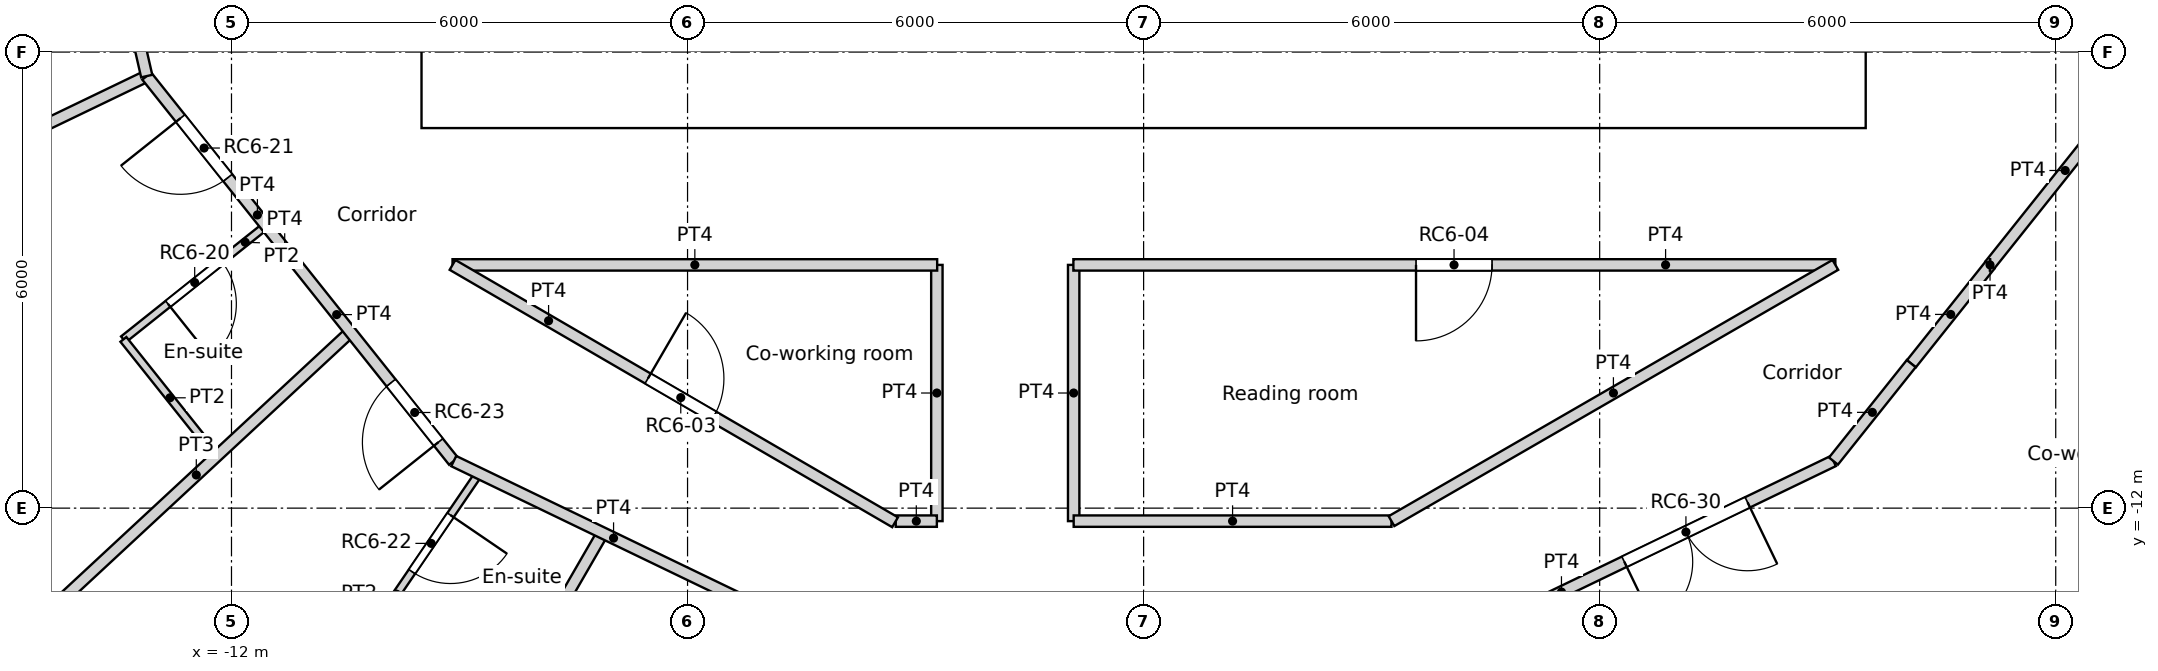
"""IFC4 building model, lengths in metres.
Left out: names, types, materials, properties, quantities, classifications, styles, units other than length and angle.
Written with IfcOpenShell. Run it as: python <this file> out.ifc"""

import sys

from ifc_helpers import new_model, si_unit, direction, frame, frame_2d, origin, origin_2d, place, context, subcontext, project, spatial, rectangle, circle, extrude, element, fill, save


model = new_model("IFC4")
c1 = context("Model", 3, precision=1e-05, world=origin(), true_north=direction((0.0, 1.0)))
c2 = subcontext(c1, "Body", "Model", "MODEL_VIEW")
j1 = project(units=[si_unit("LENGTHUNIT", "METRE"), si_unit("PLANEANGLEUNIT", "RADIAN")], contexts=[c1])
p1 = place(None, origin())
s1 = spatial("IfcSite", under=j1, at=p1, CompositionType="ELEMENT")
p2 = place(p1, origin())
s2 = spatial("IfcBuilding", under=s1, at=p2, CompositionType="ELEMENT")
p3 = place(p2, frame((0.0, 0.0, 283.8)))
s3 = spatial("IfcBuildingStorey", under=s2, at=p3, CompositionType="ELEMENT", Elevation=283.8)
p4 = place(p3, frame((-13.798, -12.802, 0.0), z_axis=(0.0, 0.0, 1.0), x_axis=(1.0, 0.0, 0.0)))
e1 = element("IfcColumn", 1, at=p4, inside=s3, PredefinedType="COLUMN", context=c2, shape_type="SweptSolid", body=[
    extrude(circle(Radius=0.45, at=origin_2d()), origin(), (0.0, 0.0, 1.0), 3.6),
])
p5 = place(p3, frame((-9.5, -6.7, 0.0), z_axis=(0.0, 0.0, 1.0), x_axis=(1.0, 0.0, 0.0)))
e2 = element("IfcWall", 2, at=p5, inside=s3, PredefinedType="SOLIDWALL", context=c2, shape_type="SweptSolid", body=[
    extrude(rectangle(XDim=19.0, YDim=0.6, at=frame_2d((9.5, 0.0))), origin(), (0.0, 0.0, 1.0), 3.6),
])
p6 = place(p5, frame((10.4, 0.0, 0.0)))
e3 = element("IfcOpeningElement", 3, at=p6, cuts=e2, PredefinedType="OPENING", context=c2, shape_type="SweptSolid", body=[
    extrude(rectangle(XDim=1.0, YDim=2.1, at=frame_2d((0.5, 1.05))), frame((0.0, 0.3, 0.0), z_axis=(0.0, -1.0, 0.0), x_axis=(1.0, 0.0, 0.0)), (0.0, 0.0, 1.0), 0.6),
])
p7 = place(p5, frame((5.35, 0.0, 0.0)))
e4 = element("IfcOpeningElement", 4, at=p7, cuts=e2, PredefinedType="OPENING", context=c2, shape_type="SweptSolid", body=[
    extrude(rectangle(XDim=1.7, YDim=2.1, at=frame_2d((0.85, 1.05))), frame((0.0, 0.3, 0.0), z_axis=(0.0, -1.0, 0.0), x_axis=(1.0, 0.0, 0.0)), (0.0, 0.0, 1.0), 0.6),
])
p8 = place(p5, frame((11.95, 0.0, 0.0)))
e5 = element("IfcOpeningElement", 5, at=p8, cuts=e2, PredefinedType="OPENING", context=c2, shape_type="SweptSolid", body=[
    extrude(rectangle(XDim=1.7, YDim=2.1, at=frame_2d((0.85, 1.05))), frame((0.0, 0.3, 0.0), z_axis=(0.0, -1.0, 0.0), x_axis=(1.0, 0.0, 0.0)), (0.0, 0.0, 1.0), 0.6),
])
p9 = place(p3, frame((-9.2, -6.4, 0.0), z_axis=(0.0, 0.0, 1.0), x_axis=(0.0, 1.0, 0.0)))
e6 = element("IfcWall", 6, at=p9, inside=s3, PredefinedType="SOLIDWALL", context=c2, shape_type="SweptSolid", body=[
    extrude(rectangle(XDim=12.8, YDim=0.6, at=frame_2d((6.4, 0.0))), origin(), (0.0, 0.0, 1.0), 3.6),
])
p10 = place(p3, frame((9.2, -6.4, 0.0), z_axis=(0.0, 0.0, 1.0), x_axis=(0.0, 1.0, 0.0)))
e7 = element("IfcWall", 7, at=p10, inside=s3, PredefinedType="SOLIDWALL", context=c2, shape_type="SweptSolid", body=[
    extrude(rectangle(XDim=12.8, YDim=0.6, at=frame_2d((6.4, 0.0))), origin(), (0.0, 0.0, 1.0), 3.6),
])
p11 = place(p10, frame((6.4, 0.0, 0.0)))
e8 = element("IfcOpeningElement", 8, at=p11, cuts=e7, PredefinedType="OPENING", context=c2, shape_type="SweptSolid", body=[
    extrude(rectangle(XDim=1.8, YDim=2.1, at=frame_2d((0.9, 1.05))), frame((0.0, 0.3, 0.0), z_axis=(0.0, -1.0, 0.0), x_axis=(1.0, 0.0, 0.0)), (0.0, 0.0, 1.0), 0.6),
])
for number, where, z_axis, x_axis in (
    (9, (-2.25, -6.4, 0.0), (0.0, 0.0, 1.0), (0.0, 1.0, 0.0)),
    (10, (0.55, -6.4, 0.0), (0.0, 0.0, 1.0), (0.0, 1.0, 0.0)),
    (11, (2.25, -6.4, 0.0), (0.0, 0.0, 1.0), (0.0, 1.0, 0.0)),
):
    element("IfcWall", number, at=place(p3, frame(where, z_axis=z_axis, x_axis=x_axis)), inside=s3, PredefinedType="SOLIDWALL", context=c2, shape_type="SweptSolid", body=[
        extrude(rectangle(XDim=3.15, YDim=0.3, at=frame_2d((1.575, 0.0))), origin(), (0.0, 0.0, 1.0), 3.25),
    ])
p12 = place(p3, frame((-9.092, -8.8, 0.0), z_axis=(0.0, 0.0, 1.0), x_axis=(1.0, 0.0, 0.0)))
e12 = element("IfcWall", 12, at=p12, inside=s3, PredefinedType="PARTITIONING", context=c2, shape_type="SweptSolid", body=[
    extrude(rectangle(XDim=6.376, YDim=0.15, at=frame_2d((3.188, 0.0))), origin(), (0.0, 0.0, 1.0), 3.25),
])
p13 = place(p3, frame((-9.092, -8.8, 0.0), z_axis=(0.0, 0.0, 1.0), x_axis=(0.864470922103, -0.502682827277, 0.0)))
e13 = element("IfcWall", 13, at=p13, inside=s3, PredefinedType="PARTITIONING", context=c2, shape_type="SweptSolid", body=[
    extrude(rectangle(XDim=6.735, YDim=0.15, at=frame_2d((3.368, 0.0))), origin(), (0.0, 0.0, 1.0), 3.25),
])
p14 = place(p13, frame((2.974, 0.0, 0.0)))
e14 = element("IfcOpeningElement", 14, at=p14, cuts=e13, PredefinedType="OPENING", context=c2, shape_type="SweptSolid", body=[
    extrude(rectangle(XDim=1.0, YDim=2.04, at=frame_2d((0.5, 1.02))), frame((0.0, 0.075, 0.0), z_axis=(0.0, -1.0, 0.0), x_axis=(1.0, 0.0, 0.0)), (0.0, 0.0, 1.0), 0.15),
])
p15 = place(p3, frame((-0.924, -8.8, 0.0), z_axis=(0.0, 0.0, 1.0), x_axis=(1.0, 0.0, 0.0)))
e15 = element("IfcWall", 15, at=p15, inside=s3, PredefinedType="PARTITIONING", context=c2, shape_type="SweptSolid", body=[
    extrude(rectangle(XDim=10.025, YDim=0.15, at=frame_2d((5.012, 0.0))), origin(), (0.0, 0.0, 1.0), 3.25),
])
p16 = place(p15, frame((4.508, 0.0, 0.0)))
e16 = element("IfcOpeningElement", 16, at=p16, cuts=e15, PredefinedType="OPENING", context=c2, shape_type="SweptSolid", body=[
    extrude(rectangle(XDim=1.0, YDim=2.04, at=frame_2d((0.5, 1.02))), frame((0.0, 0.075, 0.0), z_axis=(0.0, -1.0, 0.0), x_axis=(1.0, 0.0, 0.0)), (0.0, 0.0, 1.0), 0.15),
])
p17 = place(p3, frame((-11.3, -8.596, 0.0), z_axis=(0.0, 0.0, 1.0), x_axis=(0.623390921228, -0.781910326911, 0.0)))
e17 = element("IfcWall", 17, at=p17, inside=s3, PredefinedType="PARTITIONING", context=c2, shape_type="SweptSolid", body=[
    extrude(rectangle(XDim=3.564, YDim=0.15, at=frame_2d((1.782, 0.0))), origin(), (0.0, 0.0, 1.0), 3.25),
])
p18 = place(p17, frame((2.244, 0.0, 0.0)))
e18 = element("IfcOpeningElement", 18, at=p18, cuts=e17, PredefinedType="OPENING", context=c2, shape_type="SweptSolid", body=[
    extrude(rectangle(XDim=1.0, YDim=2.1, at=frame_2d((0.5, 1.05))), frame((0.0, 0.075, 0.0), z_axis=(0.0, -1.0, 0.0), x_axis=(1.0, 0.0, 0.0)), (0.0, 0.0, 1.0), 0.15),
])
p19 = place(p3, frame((-11.3, -8.596, 0.0), z_axis=(0.0, 0.0, 1.0), x_axis=(0.0, 1.0, 0.0)))
e19 = element("IfcWall", 19, at=p19, inside=s3, PredefinedType="PARTITIONING", context=c2, shape_type="SweptSolid", body=[
    extrude(rectangle(XDim=0.009, YDim=0.15, at=frame_2d((0.005, 0.0))), origin(), (0.0, 0.0, 1.0), 3.25),
])
p20 = place(p3, frame((11.137, -8.8, 0.0), z_axis=(0.0, 0.0, 1.0), x_axis=(-1.0, 0.0, 0.0)))
e20 = element("IfcWall", 20, at=p20, inside=s3, PredefinedType="PARTITIONING", context=c2, shape_type="SweptSolid", body=[
    extrude(rectangle(XDim=0.003, YDim=0.15, at=frame_2d((0.001, 0.0))), origin(), (0.0, 0.0, 1.0), 3.25),
])
p21 = place(p3, frame((10.101, -10.101, 0.0), z_axis=(0.0, 0.0, 1.0), x_axis=(0.623098344652, 0.782143498913, 0.0)))
e21 = element("IfcWall", 21, at=p21, inside=s3, PredefinedType="PARTITIONING", context=c2, shape_type="SweptSolid", body=[
    extrude(rectangle(XDim=1.661, YDim=0.15, at=frame_2d((0.831, 0.0))), origin(), (0.0, 0.0, 1.0), 3.25),
])
p22 = place(p3, frame((11.134, -8.8, 0.0), z_axis=(0.0, 0.0, 1.0), x_axis=(0.623476099415, 0.781842409606, 0.0)))
e22 = element("IfcWall", 22, at=p22, inside=s3, PredefinedType="PARTITIONING", context=c2, shape_type="SweptSolid", body=[
    extrude(rectangle(XDim=3.177, YDim=0.15, at=frame_2d((1.589, 0.0))), origin(), (0.0, 0.0, 1.0), 3.25),
])
p23 = place(p3, frame((-14.557, 0.0, 0.0), z_axis=(0.0, 0.0, 1.0), x_axis=(0.222489165471, -0.974935162587, 0.0)))
e23 = element("IfcWall", 23, at=p23, inside=s3, PredefinedType="PARTITIONING", context=c2, shape_type="SweptSolid", body=[
    extrude(rectangle(XDim=6.479, YDim=0.15, at=frame_2d((3.239, 0.0))), origin(), (0.0, 0.0, 1.0), 3.25),
])
p24 = place(p23, frame((0.59, 0.0, 0.0)))
e24 = element("IfcOpeningElement", 24, at=p24, cuts=e23, PredefinedType="OPENING", context=c2, shape_type="SweptSolid", body=[
    extrude(rectangle(XDim=1.0, YDim=2.1, at=frame_2d((0.5, 1.05))), frame((0.0, 0.075, 0.0), z_axis=(0.0, -1.0, 0.0), x_axis=(1.0, 0.0, 0.0)), (0.0, 0.0, 1.0), 0.15),
])
p25 = place(p23, frame((2.912, 0.0, 0.0)))
e25 = element("IfcOpeningElement", 25, at=p25, cuts=e23, PredefinedType="OPENING", context=c2, shape_type="SweptSolid", body=[
    extrude(rectangle(XDim=1.0, YDim=2.1, at=frame_2d((0.5, 1.05))), frame((0.0, 0.075, 0.0), z_axis=(0.0, -1.0, 0.0), x_axis=(1.0, 0.0, 0.0)), (0.0, 0.0, 1.0), 0.15),
])
p26 = place(p3, frame((-13.115, -6.316, 0.0), z_axis=(0.0, 0.0, 1.0), x_axis=(0.623303083673, -0.781980348784, 0.0)))
e26 = element("IfcWall", 26, at=p26, inside=s3, PredefinedType="PARTITIONING", context=c2, shape_type="SweptSolid", body=[
    extrude(rectangle(XDim=2.911, YDim=0.15, at=frame_2d((1.456, 0.0))), origin(), (0.0, 0.0, 1.0), 3.25),
])
p27 = place(p26, frame((0.71, 0.0, 0.0)))
e27 = element("IfcOpeningElement", 27, at=p27, cuts=e26, PredefinedType="OPENING", context=c2, shape_type="SweptSolid", body=[
    extrude(rectangle(XDim=1.0, YDim=2.1, at=frame_2d((0.5, 1.05))), frame((0.0, 0.075, 0.0), z_axis=(0.0, -1.0, 0.0), x_axis=(1.0, 0.0, 0.0)), (0.0, 0.0, 1.0), 0.15),
])
p28 = place(p3, frame((-3.261, -12.171, 0.0), z_axis=(0.0, 0.0, 1.0), x_axis=(1.0, 0.0, 0.0)))
e28 = element("IfcWall", 28, at=p28, inside=s3, PredefinedType="PARTITIONING", context=c2, shape_type="SweptSolid", body=[
    extrude(rectangle(XDim=0.541, YDim=0.15, at=frame_2d((0.271, 0.0))), origin(), (0.0, 0.0, 1.0), 3.25),
])
for number, where, z_axis, x_axis in (
    (29, (-2.72, -12.171, 0.0), (0.0, 0.0, 1.0), (0.0, 1.0, 0.0)),
    (30, (-0.92, -12.171, 0.0), (0.0, 0.0, 1.0), (0.0, 1.0, 0.0)),
):
    element("IfcWall", number, at=place(p3, frame(where, z_axis=z_axis, x_axis=x_axis)), inside=s3, PredefinedType="PARTITIONING", context=c2, shape_type="SweptSolid", body=[
        extrude(rectangle(XDim=3.371, YDim=0.15, at=frame_2d((1.686, 0.0))), origin(), (0.0, 0.0, 1.0), 3.25),
    ])
p29 = place(p3, frame((-0.92, -12.171, 0.0), z_axis=(0.0, 0.0, 1.0), x_axis=(1.0, 0.0, 0.0)))
e31 = element("IfcWall", 31, at=p29, inside=s3, PredefinedType="PARTITIONING", context=c2, shape_type="SweptSolid", body=[
    extrude(rectangle(XDim=4.181, YDim=0.15, at=frame_2d((2.09, 0.0))), origin(), (0.0, 0.0, 1.0), 3.25),
])
p30 = place(p3, frame((3.261, -12.171, 0.0), z_axis=(0.0, 0.0, 1.0), x_axis=(0.866066809554, 0.499928276245, 0.0)))
e32 = element("IfcWall", 32, at=p30, inside=s3, PredefinedType="PARTITIONING", context=c2, shape_type="SweptSolid", body=[
    extrude(rectangle(XDim=6.743, YDim=0.15, at=frame_2d((3.371, 0.0))), origin(), (0.0, 0.0, 1.0), 3.25),
])
p31 = place(p3, frame((-9.076, -11.381, 0.0), z_axis=(0.0, 0.0, 1.0), x_axis=(0.900778421649, -0.434278983018, 0.0)))
e33 = element("IfcWall", 33, at=p31, inside=s3, PredefinedType="PARTITIONING", context=c2, shape_type="SweptSolid", body=[
    extrude(rectangle(XDim=6.479, YDim=0.15, at=frame_2d((3.239, 0.0))), origin(), (0.0, 0.0, 1.0), 3.25),
])
p32 = place(p31, frame((4.719, 0.0, 0.0)))
e34 = element("IfcOpeningElement", 34, at=p32, cuts=e33, PredefinedType="OPENING", context=c2, shape_type="SweptSolid", body=[
    extrude(rectangle(XDim=1.0, YDim=2.1, at=frame_2d((0.5, 1.05))), frame((0.0, 0.075, 0.0), z_axis=(0.0, -1.0, 0.0), x_axis=(1.0, 0.0, 0.0)), (0.0, 0.0, 1.0), 0.15),
])
p33 = place(p3, frame((3.239, -14.192, 0.0), z_axis=(0.0, 0.0, 1.0), x_axis=(0.900851590682, 0.434127183629, 0.0)))
e35 = element("IfcWall", 35, at=p33, inside=s3, PredefinedType="PARTITIONING", context=c2, shape_type="SweptSolid", body=[
    extrude(rectangle(XDim=6.479, YDim=0.15, at=frame_2d((3.239, 0.0))), origin(), (0.0, 0.0, 1.0), 3.25),
])
p34 = place(p33, frame((0.589, 0.0, 0.0)))
e36 = element("IfcOpeningElement", 36, at=p34, cuts=e35, PredefinedType="OPENING", context=c2, shape_type="SweptSolid", body=[
    extrude(rectangle(XDim=1.0, YDim=2.1, at=frame_2d((0.5, 1.05))), frame((0.0, 0.075, 0.0), z_axis=(0.0, -1.0, 0.0), x_axis=(1.0, 0.0, 0.0)), (0.0, 0.0, 1.0), 0.15),
])
p35 = place(p33, frame((3.425, 0.0, 0.0)))
e37 = element("IfcOpeningElement", 37, at=p35, cuts=e35, PredefinedType="OPENING", context=c2, shape_type="SweptSolid", body=[
    extrude(rectangle(XDim=1.8, YDim=2.1, at=frame_2d((0.9, 1.05))), frame((0.0, 0.075, 0.0), z_axis=(0.0, -1.0, 0.0), x_axis=(1.0, 0.0, 0.0)), (0.0, 0.0, 1.0), 0.15),
])
p36 = place(p3, frame((9.076, -11.381, 0.0), z_axis=(0.0, 0.0, 1.0), x_axis=(0.623805208652, 0.781579849829, 0.0)))
e38 = element("IfcWall", 38, at=p36, inside=s3, PredefinedType="PARTITIONING", context=c2, shape_type="SweptSolid", body=[
    extrude(rectangle(XDim=1.64, YDim=0.15, at=frame_2d((0.82, 0.0))), origin(), (0.0, 0.0, 1.0), 3.25),
])
p37 = place(p3, frame((-17.813, -8.578, 0.0), z_axis=(0.0, 0.0, 1.0), x_axis=(0.901049790108, 0.433715662325, 0.0)))
e39 = element("IfcWall", 39, at=p37, inside=s3, PredefinedType="PARTITIONING", context=c2, shape_type="SweptSolid", body=[
    extrude(rectangle(XDim=5.214, YDim=0.15, at=frame_2d((2.607, 0.0))), origin(), (0.0, 0.0, 1.0), 3.25),
])
p38 = place(p3, frame((-13.422, -9.78, 0.0), z_axis=(0.0, 0.0, 1.0), x_axis=(0.781860394524, 0.623453545562, 0.0)))
e40 = element("IfcWall", 40, at=p38, inside=s3, PredefinedType="PARTITIONING", context=c2, shape_type="SweptSolid", body=[
    extrude(rectangle(XDim=2.4, YDim=0.1, at=frame_2d((1.2, 0.0))), origin(), (0.0, 0.0, 1.0), 3.25),
])
p39 = place(p38, frame((0.75, 0.0, 0.0)))
e41 = element("IfcOpeningElement", 41, at=p39, cuts=e40, PredefinedType="OPENING", context=c2, shape_type="SweptSolid", body=[
    extrude(rectangle(XDim=0.9, YDim=2.04, at=frame_2d((0.45, 1.02))), frame((0.0, 0.05, 0.0), z_axis=(0.0, -1.0, 0.0), x_axis=(1.0, 0.0, 0.0)), (0.0, 0.0, 1.0), 0.1),
])
p40 = place(p3, frame((-13.422, -9.78, 0.0), z_axis=(0.0, 0.0, 1.0), x_axis=(0.623330716607, -0.781958322249, 0.0)))
e42 = element("IfcWall", 42, at=p40, inside=s3, PredefinedType="PARTITIONING", context=c2, shape_type="SweptSolid", body=[
    extrude(rectangle(XDim=1.965, YDim=0.1, at=frame_2d((0.983, 0.0))), origin(), (0.0, 0.0, 1.0), 3.25),
])
p41 = place(p3, frame((-14.493, -13.448, 0.0), z_axis=(0.0, 0.0, 1.0), x_axis=(0.73295202722, 0.68028032883, 0.0)))
e43 = element("IfcWall", 43, at=p41, inside=s3, PredefinedType="PARTITIONING", context=c2, shape_type="SweptSolid", body=[
    extrude(rectangle(XDim=5.539, YDim=0.15, at=frame_2d((2.77, 0.0))), origin(), (0.0, 0.0, 1.0), 3.25),
])
p42 = place(p3, frame((-10.002, -13.387, 0.0), z_axis=(0.0, 0.0, 1.0), x_axis=(0.563469042551, 0.826137178734, 0.0)))
e44 = element("IfcWall", 44, at=p42, inside=s3, PredefinedType="PARTITIONING", context=c2, shape_type="SweptSolid", body=[
    extrude(rectangle(XDim=2.234, YDim=0.1, at=frame_2d((1.117, 0.0))), origin(), (0.0, 0.0, 1.0), 3.25),
])
p43 = place(p42, frame((0.667, 0.0, 0.0)))
e45 = element("IfcOpeningElement", 45, at=p43, cuts=e44, PredefinedType="OPENING", context=c2, shape_type="SweptSolid", body=[
    extrude(rectangle(XDim=0.9, YDim=2.04, at=frame_2d((0.45, 1.02))), frame((0.0, 0.05, 0.0), z_axis=(0.0, -1.0, 0.0), x_axis=(1.0, 0.0, 0.0)), (0.0, 0.0, 1.0), 0.1),
])
p44 = place(p3, frame((-8.321, -14.412, 0.0), z_axis=(0.0, 0.0, 1.0), x_axis=(0.500017667814, 0.866015203027, 0.0)))
e46 = element("IfcWall", 46, at=p44, inside=s3, PredefinedType="PARTITIONING", context=c2, shape_type="SweptSolid", body=[
    extrude(rectangle(XDim=2.41, YDim=0.15, at=frame_2d((1.205, 0.0))), origin(), (0.0, 0.0, 1.0), 3.25),
])
p45 = place(p3, frame((-6.548, -15.262, 0.0), z_axis=(0.0, 0.0, 1.0), x_axis=(0.433855388624, 0.900982520231, 0.0)))
e47 = element("IfcWall", 47, at=p45, inside=s3, PredefinedType="PARTITIONING", context=c2, shape_type="SweptSolid", body=[
    extrude(rectangle(XDim=2.399, YDim=0.1, at=frame_2d((1.2, 0.0))), origin(), (0.0, 0.0, 1.0), 3.25),
])
p46 = place(p45, frame((0.75, 0.0, 0.0)))
e48 = element("IfcOpeningElement", 48, at=p46, cuts=e47, PredefinedType="OPENING", context=c2, shape_type="SweptSolid", body=[
    extrude(rectangle(XDim=0.9, YDim=2.04, at=frame_2d((0.45, 1.02))), frame((0.0, 0.05, 0.0), z_axis=(0.0, -1.0, 0.0), x_axis=(1.0, 0.0, 0.0)), (0.0, 0.0, 1.0), 0.1),
])
p47 = place(p6, origin())
e49 = element("IfcDoor", 49, at=p47, inside=s3, OperationType="SINGLE_SWING_LEFT", PredefinedType="DOOR", context=c2, shape_type="SweptSolid", body=[
    extrude(rectangle(XDim=1.0, YDim=2.1, at=frame_2d((0.5, 1.05))), frame((0.0, 0.025, 0.0), z_axis=(0.0, -1.0, 0.0), x_axis=(1.0, 0.0, 0.0)), (0.0, 0.0, 1.0), 0.05),
])
fill(e3, e49)
p48 = place(p7, origin())
e50 = element("IfcDoor", 50, at=p48, inside=s3, OperationType="DOUBLE_DOOR_SINGLE_SWING", PredefinedType="DOOR", context=c2, shape_type="SweptSolid", body=[
    extrude(rectangle(XDim=1.7, YDim=2.1, at=frame_2d((0.85, 1.05))), frame((0.0, 0.025, 0.0), z_axis=(0.0, -1.0, 0.0), x_axis=(1.0, 0.0, 0.0)), (0.0, 0.0, 1.0), 0.05),
])
fill(e4, e50)
p49 = place(p8, origin())
e51 = element("IfcDoor", 51, at=p49, inside=s3, OperationType="DOUBLE_DOOR_SINGLE_SWING", PredefinedType="DOOR", context=c2, shape_type="SweptSolid", body=[
    extrude(rectangle(XDim=1.7, YDim=2.1, at=frame_2d((0.85, 1.05))), frame((0.0, 0.025, 0.0), z_axis=(0.0, -1.0, 0.0), x_axis=(1.0, 0.0, 0.0)), (0.0, 0.0, 1.0), 0.05),
])
fill(e5, e51)
p50 = place(p14, origin())
e52 = element("IfcDoor", 52, at=p50, inside=s3, OperationType="SINGLE_SWING_LEFT", PredefinedType="DOOR", context=c2, shape_type="SweptSolid", body=[
    extrude(rectangle(XDim=1.0, YDim=2.04, at=frame_2d((0.5, 1.02))), frame((0.0, 0.025, 0.0), z_axis=(0.0, -1.0, 0.0), x_axis=(1.0, 0.0, 0.0)), (0.0, 0.0, 1.0), 0.05),
])
fill(e14, e52)
p51 = place(p16, origin())
e53 = element("IfcDoor", 53, at=p51, inside=s3, OperationType="SINGLE_SWING_RIGHT", PredefinedType="DOOR", context=c2, shape_type="SweptSolid", body=[
    extrude(rectangle(XDim=1.0, YDim=2.04, at=frame_2d((0.5, 1.02))), frame((0.0, 0.025, 0.0), z_axis=(0.0, -1.0, 0.0), x_axis=(1.0, 0.0, 0.0)), (0.0, 0.0, 1.0), 0.05),
])
fill(e16, e53)
p52 = place(p39, origin())
e54 = element("IfcDoor", 54, at=p52, inside=s3, OperationType="SINGLE_SWING_RIGHT", PredefinedType="DOOR", context=c2, shape_type="SweptSolid", body=[
    extrude(rectangle(XDim=0.9, YDim=2.04, at=frame_2d((0.45, 1.02))), frame((0.0, 0.025, 0.0), z_axis=(0.0, -1.0, 0.0), x_axis=(1.0, 0.0, 0.0)), (0.0, 0.0, 1.0), 0.05),
])
fill(e41, e54)
p53 = place(p27, origin())
e55 = element("IfcDoor", 55, at=p53, inside=s3, OperationType="SINGLE_SWING_RIGHT", PredefinedType="DOOR", context=c2, shape_type="SweptSolid", body=[
    extrude(rectangle(XDim=1.0, YDim=2.1, at=frame_2d((0.5, 1.05))), frame((0.0, 0.025, 0.0), z_axis=(0.0, -1.0, 0.0), x_axis=(1.0, 0.0, 0.0)), (0.0, 0.0, 1.0), 0.05),
])
fill(e27, e55)
p54 = place(p43, origin())
e56 = element("IfcDoor", 56, at=p54, inside=s3, OperationType="SINGLE_SWING_LEFT", PredefinedType="DOOR", context=c2, shape_type="SweptSolid", body=[
    extrude(rectangle(XDim=0.9, YDim=2.04, at=frame_2d((0.45, 1.02))), frame((0.0, 0.025, 0.0), z_axis=(0.0, -1.0, 0.0), x_axis=(1.0, 0.0, 0.0)), (0.0, 0.0, 1.0), 0.05),
])
fill(e45, e56)
p55 = place(p18, origin())
e57 = element("IfcDoor", 57, at=p55, inside=s3, OperationType="SINGLE_SWING_LEFT", PredefinedType="DOOR", context=c2, shape_type="SweptSolid", body=[
    extrude(rectangle(XDim=1.0, YDim=2.1, at=frame_2d((0.5, 1.05))), frame((0.0, 0.025, 0.0), z_axis=(0.0, -1.0, 0.0), x_axis=(1.0, 0.0, 0.0)), (0.0, 0.0, 1.0), 0.05),
])
fill(e18, e57)
p56 = place(p35, origin())
e58 = element("IfcDoor", 58, at=p56, inside=s3, OperationType="DOUBLE_DOOR_SINGLE_SWING", PredefinedType="DOOR", context=c2, shape_type="SweptSolid", body=[
    extrude(rectangle(XDim=1.8, YDim=2.1, at=frame_2d((0.9, 1.05))), frame((0.0, 0.025, 0.0), z_axis=(0.0, -1.0, 0.0), x_axis=(1.0, 0.0, 0.0)), (0.0, 0.0, 1.0), 0.05),
])
fill(e37, e58)
save(model, sys.argv[1])
